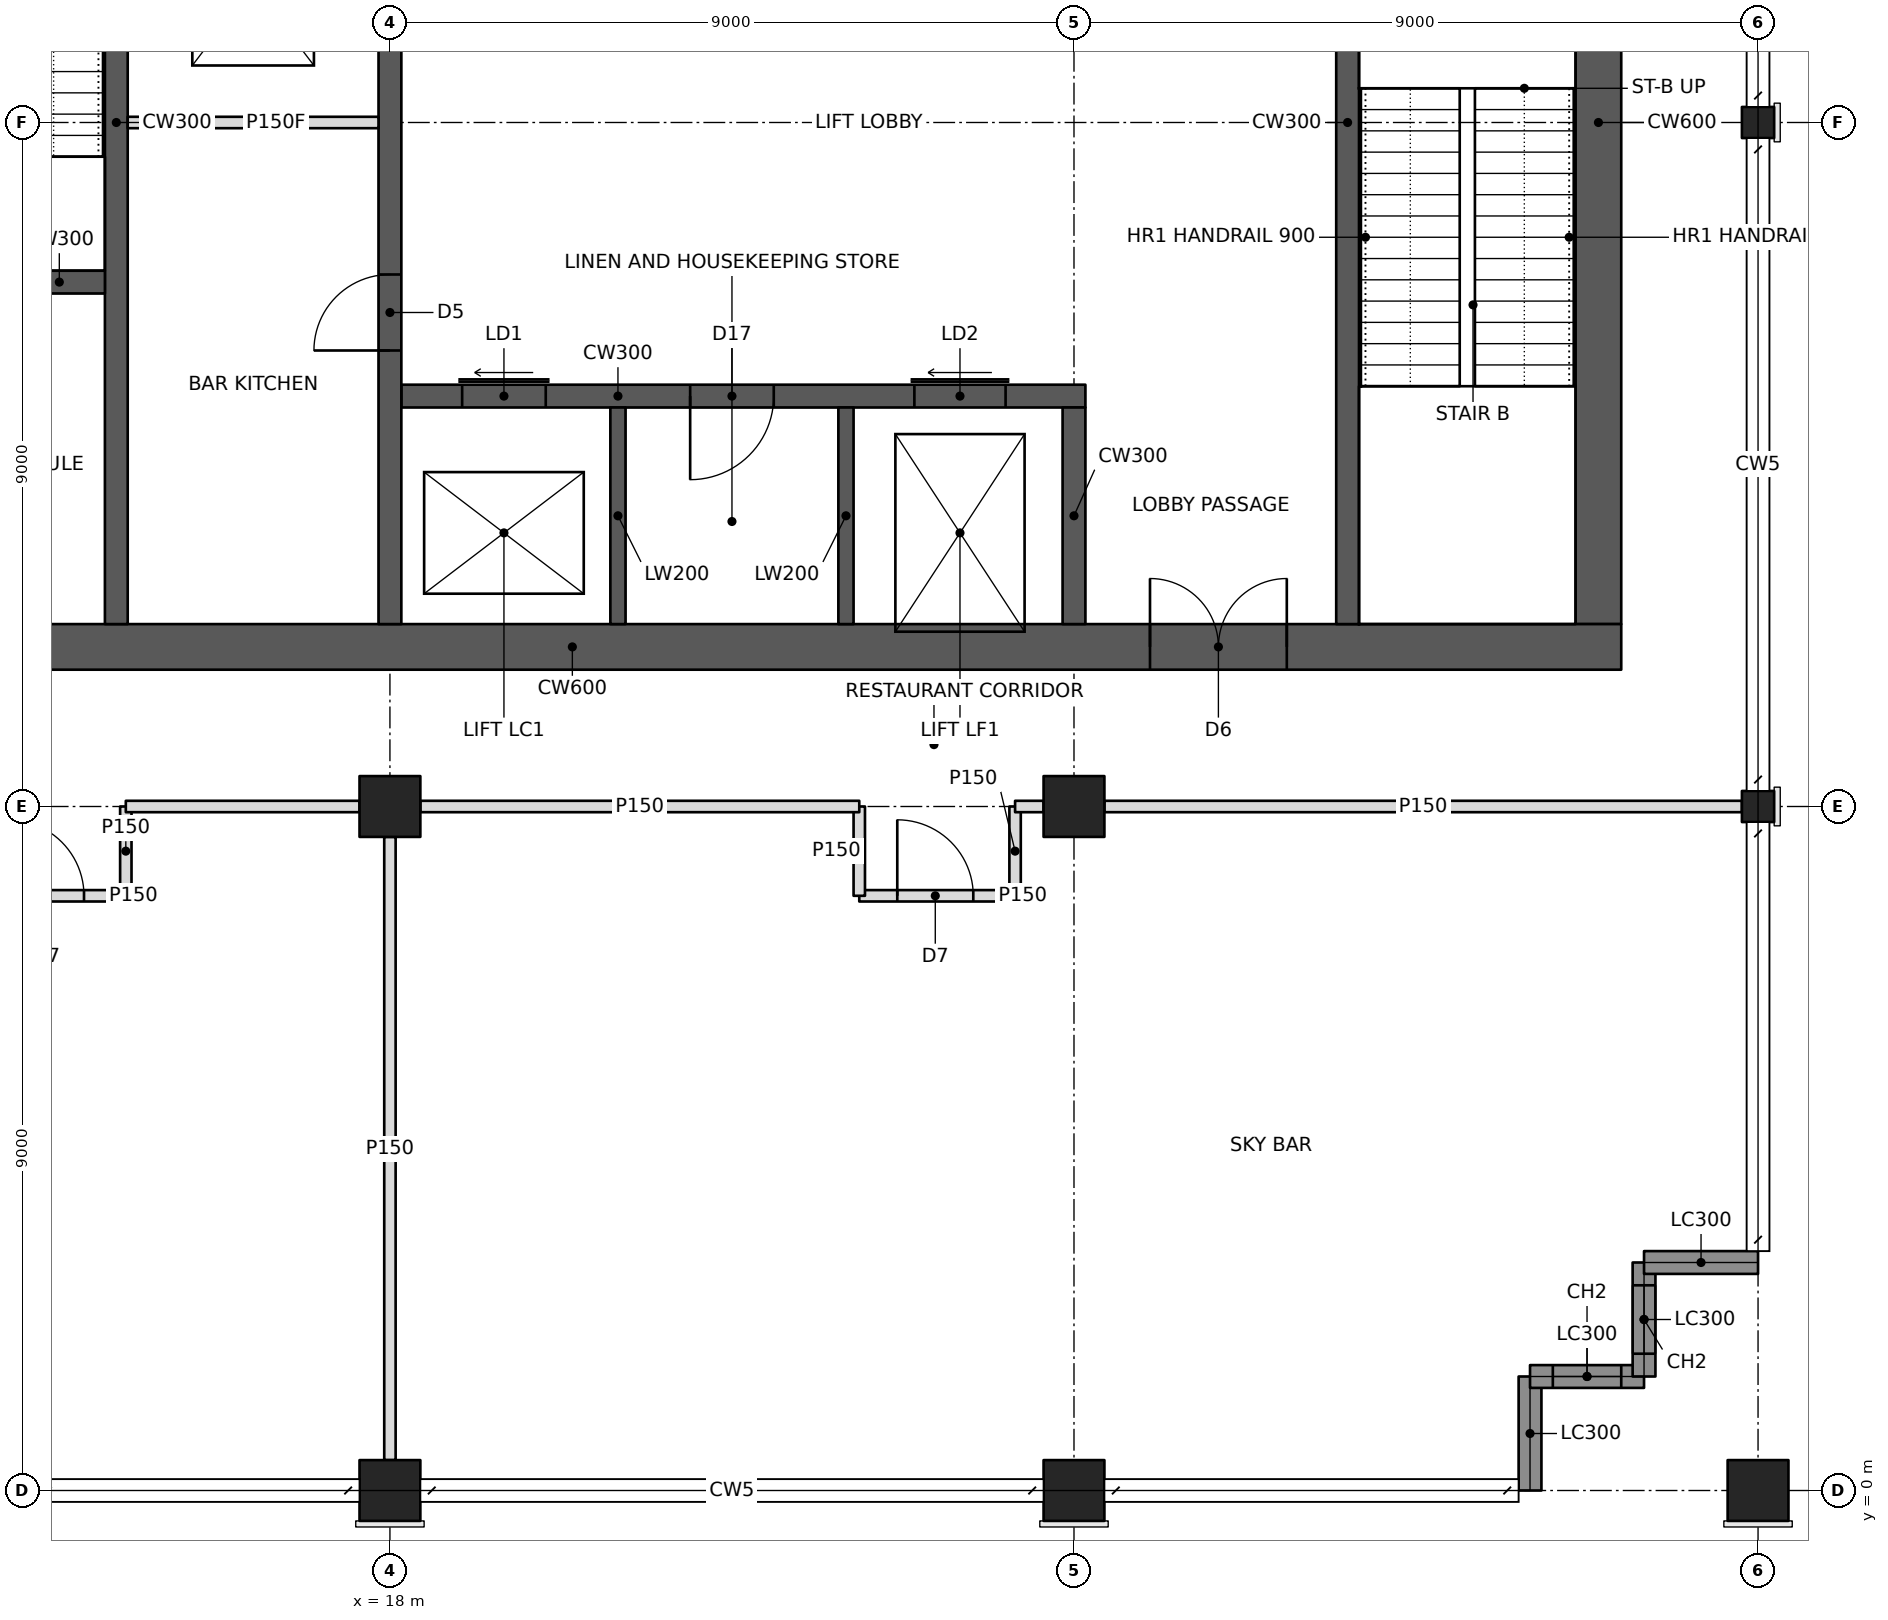
"""IFC4 building model, lengths in metres.
Left out: names, types, materials, properties, quantities, classifications, styles, units other than length and angle.
Written with IfcOpenShell. Run it as: python <this file> out.ifc"""

import sys

from ifc_helpers import new_model, si_unit, direction, frame, frame_2d, origin, origin_2d, place, context, subcontext, project, spatial, rectangle, hollow_rectangle, i_section, extrude, element, fill, save


model = new_model("IFC4")
c1 = context("Model", 3, precision=1e-05, world=origin(), true_north=direction((0.0, 1.0)))
c2 = subcontext(c1, "Body", "Model", "MODEL_VIEW")
j1 = project(units=[si_unit("LENGTHUNIT", "METRE"), si_unit("PLANEANGLEUNIT", "RADIAN")], contexts=[c1])
p1 = place(None, origin())
s1 = spatial("IfcSite", under=j1, at=p1, CompositionType="ELEMENT")
p2 = place(p1, origin())
s2 = spatial("IfcBuilding", under=s1, at=p2, CompositionType="ELEMENT")
p3 = place(p2, frame((0.0, 0.0, 269.8)))
s3 = spatial("IfcBuildingStorey", under=s2, at=p3, CompositionType="ELEMENT", Elevation=269.8)
for number, where, z_axis, x_axis in (
    (1, (18.0, 0.0, 0.0), (0.0, 0.0, 1.0), (1.0, 0.0, 0.0)),
    (2, (18.0, 9.0, 0.0), (0.0, 0.0, 1.0), (1.0, 0.0, 0.0)),
    (3, (27.0, 0.0, 0.0), (0.0, 0.0, 1.0), (1.0, 0.0, 0.0)),
    (4, (27.0, 9.0, 0.0), (0.0, 0.0, 1.0), (1.0, 0.0, 0.0)),
    (5, (36.0, 0.0, 0.0), (0.0, 0.0, 1.0), (1.0, 0.0, 0.0)),
):
    element("IfcColumn", number, at=place(p3, frame(where, z_axis=z_axis, x_axis=x_axis)), inside=s3, PredefinedType="COLUMN", context=c2, shape_type="SweptSolid", body=[
        extrude(hollow_rectangle(XDim=0.8, YDim=0.8, WallThickness=0.025, at=origin_2d()), origin(), (0.0, 0.0, 1.0), 5.0),
    ])
for number, where, z_axis, x_axis in (
    (6, (36.0, 9.0, 0.0), (0.0, 0.0, 1.0), (0.0, 1.0, 0.0)),
    (7, (36.0, 18.0, 0.0), (0.0, 0.0, 1.0), (0.0, 1.0, 0.0)),
):
    element("IfcColumn", number, at=place(p3, frame(where, z_axis=z_axis, x_axis=x_axis)), inside=s3, PredefinedType="COLUMN", context=c2, shape_type="SweptSolid", body=[
        extrude(i_section(OverallWidth=0.409, OverallDepth=0.424, WebThickness=0.033, FlangeThickness=0.052, at=origin_2d()), origin(), (0.0, 0.0, 1.0), 5.0),
    ])
p4 = place(p3, frame((10.8, 11.1, 0.0), z_axis=(0.0, 0.0, 1.0), x_axis=(1.0, 0.0, 0.0)))
e8 = element("IfcWall", 8, at=p4, inside=s3, PredefinedType="SHEAR", context=c2, shape_type="SweptSolid", body=[
    extrude(rectangle(XDim=23.4, YDim=0.6, at=frame_2d((11.7, 0.0))), origin(), (0.0, 0.0, 1.0), 5.0),
])
p5 = place(p4, frame((1.0, 0.0, 0.0)))
e9 = element("IfcOpeningElement", 9, at=p5, cuts=e8, PredefinedType="OPENING", context=c2, shape_type="SweptSolid", body=[
    extrude(rectangle(XDim=1.0, YDim=2.1, at=frame_2d((0.5, 1.05))), frame((0.0, 0.31, 0.0), z_axis=(0.0, -1.0, 0.0), x_axis=(1.0, 0.0, 0.0)), (0.0, 0.0, 1.0), 0.62),
])
p6 = place(p4, frame((17.2, 0.0, 0.0)))
e10 = element("IfcOpeningElement", 10, at=p6, cuts=e8, PredefinedType="OPENING", context=c2, shape_type="SweptSolid", body=[
    extrude(rectangle(XDim=1.8, YDim=2.1, at=frame_2d((0.9, 1.05))), frame((0.0, 0.31, 0.0), z_axis=(0.0, -1.0, 0.0), x_axis=(1.0, 0.0, 0.0)), (0.0, 0.0, 1.0), 0.62),
])
p7 = place(p3, frame((33.9, 11.4, 0.0), z_axis=(0.0, 0.0, 1.0), x_axis=(0.0, 1.0, 0.0)))
e11 = element("IfcWall", 11, at=p7, inside=s3, PredefinedType="SHEAR", context=c2, shape_type="SweptSolid", body=[
    extrude(rectangle(XDim=13.2, YDim=0.6, at=frame_2d((6.6, 0.0))), origin(), (0.0, 0.0, 1.0), 5.0),
])
p8 = place(p3, frame((14.4, 11.4, 0.0), z_axis=(0.0, 0.0, 1.0), x_axis=(0.0, 1.0, 0.0)))
e12 = element("IfcWall", 12, at=p8, inside=s3, PredefinedType="SHEAR", context=c2, shape_type="SweptSolid", body=[
    extrude(rectangle(XDim=13.2, YDim=0.3, at=frame_2d((6.6, 0.0))), origin(), (0.0, 0.0, 1.0), 5.0),
])
p9 = place(p3, frame((11.4, 15.9, 0.0), z_axis=(0.0, 0.0, 1.0), x_axis=(1.0, 0.0, 0.0)))
e13 = element("IfcWall", 13, at=p9, inside=s3, PredefinedType="SHEAR", context=c2, shape_type="SweptSolid", body=[
    extrude(rectangle(XDim=2.85, YDim=0.3, at=frame_2d((1.425, 0.0))), origin(), (0.0, 0.0, 1.0), 5.0),
])
p10 = place(p9, frame((0.5, 0.0, 0.0)))
e14 = element("IfcOpeningElement", 14, at=p10, cuts=e13, PredefinedType="OPENING", context=c2, shape_type="SweptSolid", body=[
    extrude(rectangle(XDim=1.0, YDim=2.1, at=frame_2d((0.5, 1.05))), frame((0.0, 0.16, 0.0), z_axis=(0.0, -1.0, 0.0), x_axis=(1.0, 0.0, 0.0)), (0.0, 0.0, 1.0), 0.32),
])
p11 = place(p3, frame((18.0, 11.4, 0.0), z_axis=(0.0, 0.0, 1.0), x_axis=(0.0, 1.0, 0.0)))
e15 = element("IfcWall", 15, at=p11, inside=s3, PredefinedType="SHEAR", context=c2, shape_type="SweptSolid", body=[
    extrude(rectangle(XDim=13.2, YDim=0.3, at=frame_2d((6.6, 0.0))), origin(), (0.0, 0.0, 1.0), 5.0),
])
p12 = place(p11, frame((3.6, 0.0, 0.0)))
e16 = element("IfcOpeningElement", 16, at=p12, cuts=e15, PredefinedType="OPENING", context=c2, shape_type="SweptSolid", body=[
    extrude(rectangle(XDim=1.0, YDim=2.1, at=frame_2d((0.5, 1.05))), frame((0.0, 0.16, 0.0), z_axis=(0.0, -1.0, 0.0), x_axis=(1.0, 0.0, 0.0)), (0.0, 0.0, 1.0), 0.32),
])
p13 = place(p11, frame((7.85, 0.0, 0.0)))
e17 = element("IfcOpeningElement", 17, at=p13, cuts=e15, PredefinedType="OPENING", context=c2, shape_type="SweptSolid", body=[
    extrude(rectangle(XDim=1.1, YDim=2.1, at=frame_2d((0.55, 1.05))), frame((0.0, 0.16, 0.0), z_axis=(0.0, -1.0, 0.0), x_axis=(1.0, 0.0, 0.0)), (0.0, 0.0, 1.0), 0.32),
])
p14 = place(p3, frame((14.55, 18.0, 0.0), z_axis=(0.0, 0.0, 1.0), x_axis=(1.0, 0.0, 0.0)))
e18 = element("IfcWall", 18, at=p14, inside=s3, PredefinedType="PARTITIONING", context=c2, shape_type="SweptSolid", body=[
    extrude(rectangle(XDim=3.3, YDim=0.15, at=frame_2d((1.65, 0.0))), origin(), (0.0, 0.0, 1.0), 4.75),
])
p15 = place(p3, frame((18.15, 14.4, 0.0), z_axis=(0.0, 0.0, 1.0), x_axis=(1.0, 0.0, 0.0)))
e19 = element("IfcWall", 19, at=p15, inside=s3, PredefinedType="SHEAR", context=c2, shape_type="SweptSolid", body=[
    extrude(rectangle(XDim=9.0, YDim=0.3, at=frame_2d((4.5, 0.0))), origin(), (0.0, 0.0, 1.0), 5.0),
])
p16 = place(p15, frame((0.8, 0.0, 0.0)))
e20 = element("IfcOpeningElement", 20, at=p16, cuts=e19, PredefinedType="OPENING", context=c2, shape_type="SweptSolid", body=[
    extrude(rectangle(XDim=1.1, YDim=2.1, at=frame_2d((0.55, 1.05))), frame((0.0, 0.16, 0.0), z_axis=(0.0, -1.0, 0.0), x_axis=(1.0, 0.0, 0.0)), (0.0, 0.0, 1.0), 0.32),
])
p17 = place(p15, frame((6.75, 0.0, 0.0)))
e21 = element("IfcOpeningElement", 21, at=p17, cuts=e19, PredefinedType="OPENING", context=c2, shape_type="SweptSolid", body=[
    extrude(rectangle(XDim=1.2, YDim=2.1, at=frame_2d((0.6, 1.05))), frame((0.0, 0.16, 0.0), z_axis=(0.0, -1.0, 0.0), x_axis=(1.0, 0.0, 0.0)), (0.0, 0.0, 1.0), 0.32),
])
p18 = place(p15, frame((3.8, 0.0, 0.0)))
e22 = element("IfcOpeningElement", 22, at=p18, cuts=e19, PredefinedType="OPENING", context=c2, shape_type="SweptSolid", body=[
    extrude(rectangle(XDim=1.1, YDim=2.1, at=frame_2d((0.55, 1.05))), frame((0.0, 0.16, 0.0), z_axis=(0.0, -1.0, 0.0), x_axis=(1.0, 0.0, 0.0)), (0.0, 0.0, 1.0), 0.32),
])
p19 = place(p3, frame((27.0, 11.4, 0.0), z_axis=(0.0, 0.0, 1.0), x_axis=(0.0, 1.0, 0.0)))
e23 = element("IfcWall", 23, at=p19, inside=s3, PredefinedType="SHEAR", context=c2, shape_type="SweptSolid", body=[
    extrude(rectangle(XDim=2.85, YDim=0.3, at=frame_2d((1.425, 0.0))), origin(), (0.0, 0.0, 1.0), 5.0),
])
for number, where, z_axis, x_axis in (
    (24, (21.0, 11.4, 0.0), (0.0, 0.0, 1.0), (0.0, 1.0, 0.0)),
    (25, (24.0, 11.4, 0.0), (0.0, 0.0, 1.0), (0.0, 1.0, 0.0)),
):
    element("IfcWall", number, at=place(p3, frame(where, z_axis=z_axis, x_axis=x_axis)), inside=s3, PredefinedType="SHEAR", context=c2, shape_type="SweptSolid", body=[
        extrude(rectangle(XDim=2.85, YDim=0.2, at=frame_2d((1.425, 0.0))), origin(), (0.0, 0.0, 1.0), 5.0),
    ])
p20 = place(p3, frame((30.6, 11.4, 0.0), z_axis=(0.0, 0.0, 1.0), x_axis=(0.0, 1.0, 0.0)))
e26 = element("IfcWall", 26, at=p20, inside=s3, PredefinedType="SHEAR", context=c2, shape_type="SweptSolid", body=[
    extrude(rectangle(XDim=13.2, YDim=0.3, at=frame_2d((6.6, 0.0))), origin(), (0.0, 0.0, 1.0), 5.0),
])
p21 = place(p3, frame((33.0, 0.0, 0.0), z_axis=(0.0, 0.0, 1.0), x_axis=(0.0, 1.0, 0.0)))
e27 = element("IfcWall", 27, at=p21, inside=s3, PredefinedType="SOLIDWALL", context=c2, shape_type="SweptSolid", body=[
    extrude(rectangle(XDim=1.5, YDim=0.3, at=frame_2d((0.75, 0.0))), origin(), (0.0, 0.0, 1.0), 3.97),
])
p22 = place(p3, frame((33.0, 1.5, 0.0), z_axis=(0.0, 0.0, 1.0), x_axis=(1.0, 0.0, 0.0)))
e28 = element("IfcWall", 28, at=p22, inside=s3, PredefinedType="SOLIDWALL", context=c2, shape_type="SweptSolid", body=[
    extrude(rectangle(XDim=1.5, YDim=0.3, at=frame_2d((0.75, 0.0))), origin(), (0.0, 0.0, 1.0), 4.142),
])
p23 = place(p22, frame((0.3, 0.0, 0.6)))
e29 = element("IfcOpeningElement", 29, at=p23, cuts=e28, PredefinedType="OPENING", context=c2, shape_type="SweptSolid", body=[
    extrude(rectangle(XDim=0.9, YDim=2.2, at=frame_2d((0.45, 1.1))), frame((0.0, 0.16, 0.0), z_axis=(0.0, -1.0, 0.0), x_axis=(1.0, 0.0, 0.0)), (0.0, 0.0, 1.0), 0.32),
])
p24 = place(p3, frame((34.5, 1.5, 0.0), z_axis=(0.0, 0.0, 1.0), x_axis=(0.0, 1.0, 0.0)))
e30 = element("IfcWall", 30, at=p24, inside=s3, PredefinedType="SOLIDWALL", context=c2, shape_type="SweptSolid", body=[
    extrude(rectangle(XDim=1.5, YDim=0.3, at=frame_2d((0.75, 0.0))), origin(), (0.0, 0.0, 1.0), 4.75),
])
p25 = place(p24, frame((0.3, 0.0, 0.6)))
e31 = element("IfcOpeningElement", 31, at=p25, cuts=e30, PredefinedType="OPENING", context=c2, shape_type="SweptSolid", body=[
    extrude(rectangle(XDim=0.9, YDim=2.2, at=frame_2d((0.45, 1.1))), frame((0.0, 0.16, 0.0), z_axis=(0.0, -1.0, 0.0), x_axis=(1.0, 0.0, 0.0)), (0.0, 0.0, 1.0), 0.32),
])
p26 = place(p3, frame((34.5, 3.0, 0.0), z_axis=(0.0, 0.0, 1.0), x_axis=(1.0, 0.0, 0.0)))
e32 = element("IfcWall", 32, at=p26, inside=s3, PredefinedType="SOLIDWALL", context=c2, shape_type="SweptSolid", body=[
    extrude(rectangle(XDim=1.5, YDim=0.3, at=frame_2d((0.75, 0.0))), origin(), (0.0, 0.0, 1.0), 3.97),
])
p27 = place(p3, frame((18.0, 8.6, 0.0), z_axis=(0.0, 0.0, 1.0), x_axis=(0.0, -1.0, 0.0)))
e33 = element("IfcWall", 33, at=p27, inside=s3, PredefinedType="PARTITIONING", context=c2, shape_type="SweptSolid", body=[
    extrude(rectangle(XDim=8.2, YDim=0.15, at=frame_2d((4.1, 0.0))), origin(), (0.0, 0.0, 1.0), 3.802),
])
p28 = place(p3, frame((18.4, 9.0, 0.0), z_axis=(0.0, 0.0, 1.0), x_axis=(1.0, 0.0, 0.0)))
e34 = element("IfcWall", 34, at=p28, inside=s3, PredefinedType="PARTITIONING", context=c2, shape_type="SweptSolid", body=[
    extrude(rectangle(XDim=5.775, YDim=0.15, at=frame_2d((2.888, 0.0))), origin(), (0.0, 0.0, 1.0), 3.802),
])
p29 = place(p3, frame((27.4, 9.0, 0.0), z_axis=(0.0, 0.0, 1.0), x_axis=(1.0, 0.0, 0.0)))
e35 = element("IfcWall", 35, at=p29, inside=s3, PredefinedType="PARTITIONING", context=c2, shape_type="SweptSolid", body=[
    extrude(rectangle(XDim=8.388, YDim=0.15, at=frame_2d((4.194, 0.0))), origin(), (0.0, 0.0, 1.0), 3.802),
])
p30 = place(p3, frame((14.525, 9.0, 0.0), z_axis=(0.0, 0.0, 1.0), x_axis=(1.0, 0.0, 0.0)))
e36 = element("IfcWall", 36, at=p30, inside=s3, PredefinedType="PARTITIONING", context=c2, shape_type="SweptSolid", body=[
    extrude(rectangle(XDim=3.075, YDim=0.15, at=frame_2d((1.538, 0.0))), origin(), (0.0, 0.0, 1.0), 3.802),
])
p31 = place(p3, frame((14.525, 9.0, 0.0), z_axis=(0.0, 0.0, 1.0), x_axis=(0.0, -1.0, 0.0)))
e37 = element("IfcWall", 37, at=p31, inside=s3, PredefinedType="PARTITIONING", context=c2, shape_type="SweptSolid", body=[
    extrude(rectangle(XDim=1.175, YDim=0.15, at=frame_2d((0.587, 0.0))), origin(), (0.0, 0.0, 1.0), 3.802),
])
p32 = place(p3, frame((12.475, 7.825, 0.0), z_axis=(0.0, 0.0, 1.0), x_axis=(1.0, 0.0, 0.0)))
e38 = element("IfcWall", 38, at=p32, inside=s3, PredefinedType="PARTITIONING", context=c2, shape_type="SweptSolid", body=[
    extrude(rectangle(XDim=2.05, YDim=0.15, at=frame_2d((1.025, 0.0))), origin(), (0.0, 0.0, 1.0), 4.75),
])
p33 = place(p32, frame((0.5, 0.0, 0.0)))
e39 = element("IfcOpeningElement", 39, at=p33, cuts=e38, PredefinedType="OPENING", context=c2, shape_type="SweptSolid", body=[
    extrude(rectangle(XDim=1.0, YDim=2.1, at=frame_2d((0.5, 1.05))), frame((0.0, 0.085, 0.0), z_axis=(0.0, -1.0, 0.0), x_axis=(1.0, 0.0, 0.0)), (0.0, 0.0, 1.0), 0.17),
])
p34 = place(p3, frame((26.225, 9.0, 0.0), z_axis=(0.0, 0.0, 1.0), x_axis=(1.0, 0.0, 0.0)))
e40 = element("IfcWall", 40, at=p34, inside=s3, PredefinedType="PARTITIONING", context=c2, shape_type="SweptSolid", body=[
    extrude(rectangle(XDim=0.375, YDim=0.15, at=frame_2d((0.188, 0.0))), origin(), (0.0, 0.0, 1.0), 3.802),
])
for number, where, z_axis, x_axis in (
    (41, (24.175, 9.0, 0.0), (0.0, 0.0, 1.0), (0.0, -1.0, 0.0)),
    (42, (26.225, 9.0, 0.0), (0.0, 0.0, 1.0), (0.0, -1.0, 0.0)),
):
    element("IfcWall", number, at=place(p3, frame(where, z_axis=z_axis, x_axis=x_axis)), inside=s3, PredefinedType="PARTITIONING", context=c2, shape_type="SweptSolid", body=[
        extrude(rectangle(XDim=1.175, YDim=0.15, at=frame_2d((0.587, 0.0))), origin(), (0.0, 0.0, 1.0), 3.802),
    ])
p35 = place(p3, frame((24.175, 7.825, 0.0), z_axis=(0.0, 0.0, 1.0), x_axis=(1.0, 0.0, 0.0)))
e43 = element("IfcWall", 43, at=p35, inside=s3, PredefinedType="PARTITIONING", context=c2, shape_type="SweptSolid", body=[
    extrude(rectangle(XDim=2.05, YDim=0.15, at=frame_2d((1.025, 0.0))), origin(), (0.0, 0.0, 1.0), 4.75),
])
p36 = place(p35, frame((0.5, 0.0, 0.0)))
e44 = element("IfcOpeningElement", 44, at=p36, cuts=e43, PredefinedType="OPENING", context=c2, shape_type="SweptSolid", body=[
    extrude(rectangle(XDim=1.0, YDim=2.1, at=frame_2d((0.5, 1.05))), frame((0.0, 0.085, 0.0), z_axis=(0.0, -1.0, 0.0), x_axis=(1.0, 0.0, 0.0)), (0.0, 0.0, 1.0), 0.17),
])
p37 = place(p23, origin())
e45 = element("IfcWindow", 45, at=p37, inside=s3, PartitioningType="SINGLE_PANEL", PredefinedType="WINDOW", context=c2, shape_type="SweptSolid", body=[
    extrude(rectangle(XDim=0.9, YDim=2.2, at=frame_2d((0.45, 1.1))), frame((0.0, 0.03, 0.0), z_axis=(0.0, -1.0, 0.0), x_axis=(1.0, 0.0, 0.0)), (0.0, 0.0, 1.0), 0.06),
])
fill(e29, e45)
p38 = place(p25, origin())
e46 = element("IfcWindow", 46, at=p38, inside=s3, PartitioningType="SINGLE_PANEL", PredefinedType="WINDOW", context=c2, shape_type="SweptSolid", body=[
    extrude(rectangle(XDim=0.9, YDim=2.2, at=frame_2d((0.45, 1.1))), frame((0.0, 0.03, 0.0), z_axis=(0.0, -1.0, 0.0), x_axis=(1.0, 0.0, 0.0)), (0.0, 0.0, 1.0), 0.06),
])
fill(e31, e46)
p39 = place(p33, origin())
e47 = element("IfcDoor", 47, at=p39, inside=s3, OperationType="SINGLE_SWING_LEFT", PredefinedType="DOOR", context=c2, shape_type="SweptSolid", body=[
    extrude(rectangle(XDim=1.0, YDim=2.1, at=frame_2d((0.5, 1.05))), frame((0.0, 0.025, 0.0), z_axis=(0.0, -1.0, 0.0), x_axis=(1.0, 0.0, 0.0)), (0.0, 0.0, 1.0), 0.05),
])
fill(e39, e47)
p40 = place(p36, origin())
e48 = element("IfcDoor", 48, at=p40, inside=s3, OperationType="SINGLE_SWING_LEFT", PredefinedType="DOOR", context=c2, shape_type="SweptSolid", body=[
    extrude(rectangle(XDim=1.0, YDim=2.1, at=frame_2d((0.5, 1.05))), frame((0.0, 0.025, 0.0), z_axis=(0.0, -1.0, 0.0), x_axis=(1.0, 0.0, 0.0)), (0.0, 0.0, 1.0), 0.05),
])
fill(e44, e48)
p41 = place(p6, origin())
e49 = element("IfcDoor", 49, at=p41, inside=s3, OperationType="DOUBLE_DOOR_SINGLE_SWING", PredefinedType="DOOR", context=c2, shape_type="SweptSolid", body=[
    extrude(rectangle(XDim=1.8, YDim=2.1, at=frame_2d((0.9, 1.05))), frame((0.0, 0.025, 0.0), z_axis=(0.0, -1.0, 0.0), x_axis=(1.0, 0.0, 0.0)), (0.0, 0.0, 1.0), 0.05),
])
fill(e10, e49)
p42 = place(p12, origin())
e50 = element("IfcDoor", 50, at=p42, inside=s3, OperationType="SINGLE_SWING_LEFT", PredefinedType="DOOR", context=c2, shape_type="SweptSolid", body=[
    extrude(rectangle(XDim=1.0, YDim=2.1, at=frame_2d((0.5, 1.05))), frame((0.0, 0.025, 0.0), z_axis=(0.0, -1.0, 0.0), x_axis=(1.0, 0.0, 0.0)), (0.0, 0.0, 1.0), 0.05),
])
fill(e16, e50)
p43 = place(p16, origin())
e51 = element("IfcDoor", 51, at=p43, inside=s3, OperationType="SLIDING_TO_LEFT", PredefinedType="DOOR", context=c2, shape_type="SweptSolid", body=[
    extrude(rectangle(XDim=1.1, YDim=2.1, at=frame_2d((0.55, 1.05))), frame((0.0, 0.025, 0.0), z_axis=(0.0, -1.0, 0.0), x_axis=(1.0, 0.0, 0.0)), (0.0, 0.0, 1.0), 0.05),
])
fill(e20, e51)
p44 = place(p17, origin())
e52 = element("IfcDoor", 52, at=p44, inside=s3, OperationType="SLIDING_TO_LEFT", PredefinedType="DOOR", context=c2, shape_type="SweptSolid", body=[
    extrude(rectangle(XDim=1.2, YDim=2.1, at=frame_2d((0.6, 1.05))), frame((0.0, 0.025, 0.0), z_axis=(0.0, -1.0, 0.0), x_axis=(1.0, 0.0, 0.0)), (0.0, 0.0, 1.0), 0.05),
])
fill(e21, e52)
p45 = place(p18, frame((1.1, 0.0, 0.0), z_axis=(0.0, 0.0, 1.0), x_axis=(-1.0, 0.0, 0.0)))
e53 = element("IfcDoor", 53, at=p45, inside=s3, OperationType="SINGLE_SWING_RIGHT", PredefinedType="DOOR", context=c2, shape_type="SweptSolid", body=[
    extrude(rectangle(XDim=1.1, YDim=2.1, at=frame_2d((0.55, 1.05))), frame((0.0, 0.025, 0.0), z_axis=(0.0, -1.0, 0.0), x_axis=(1.0, 0.0, 0.0)), (0.0, 0.0, 1.0), 0.05),
])
fill(e22, e53)
save(model, sys.argv[1])
